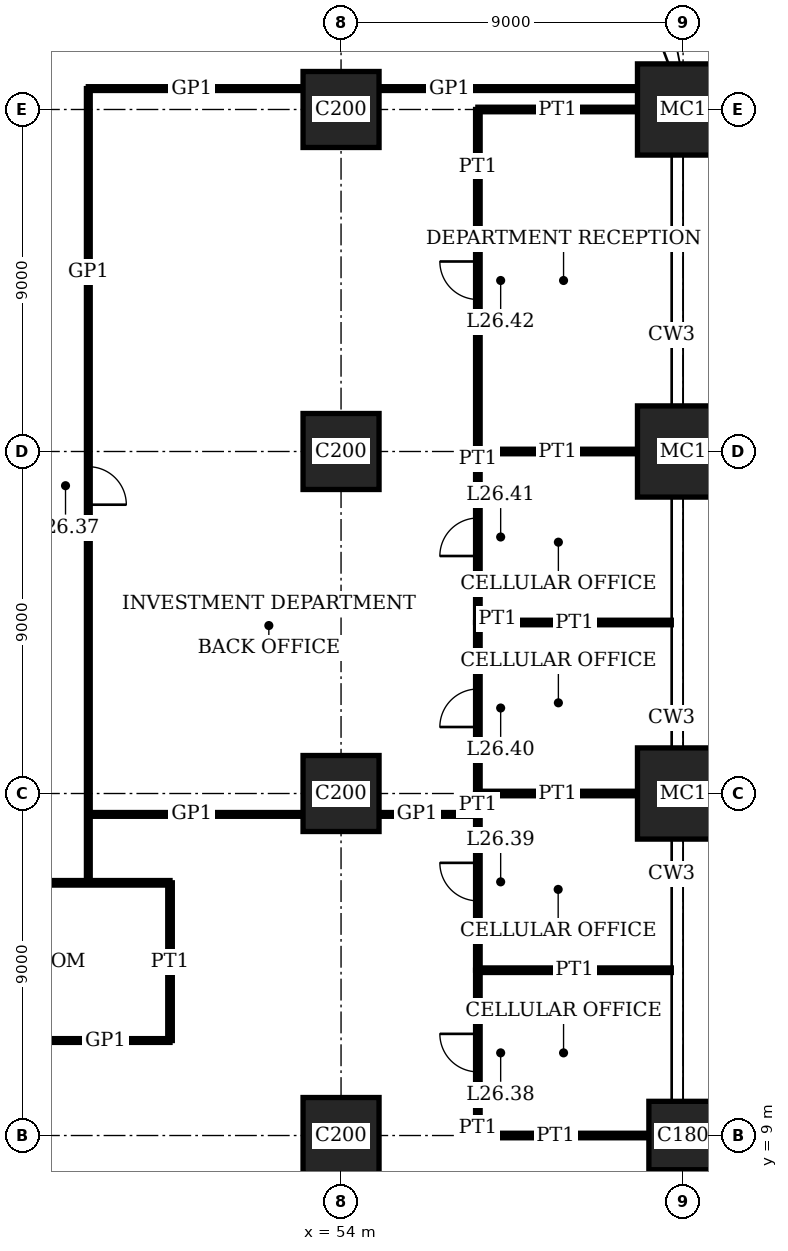
"""IFC4 building model, lengths in metres.
Left out: names, types, materials, properties, quantities, classifications, styles, units other than length and angle.
Written with IfcOpenShell. Run it as: python <this file> out.ifc"""

import sys

from ifc_helpers import new_model, si_unit, direction, frame, frame_2d, origin, origin_2d, place, context, subcontext, project, spatial, rectangle, extrude, element, fill, save


model = new_model("IFC4")
c1 = context("Model", 3, precision=1e-05, world=origin(), true_north=direction((0.0, 1.0)))
c2 = subcontext(c1, "Body", "Model", "MODEL_VIEW")
j1 = project(units=[si_unit("LENGTHUNIT", "METRE"), si_unit("PLANEANGLEUNIT", "RADIAN")], contexts=[c1])
p1 = place(None, origin())
s1 = spatial("IfcSite", under=j1, at=p1, CompositionType="ELEMENT")
p2 = place(p1, origin())
s2 = spatial("IfcBuilding", under=s1, at=p2, CompositionType="ELEMENT")
p3 = place(p2, frame((0.0, 0.0, 109.0)))
s3 = spatial("IfcBuildingStorey", under=s2, at=p3, CompositionType="ELEMENT", Elevation=109.0)
for number, where, z_axis, x_axis in (
    (1, (54.0, 9.0, 0.0), (0.0, 0.0, 1.0), (1.0, 0.0, 0.0)),
    (2, (54.0, 18.0, 0.0), (0.0, 0.0, 1.0), (1.0, 0.0, 0.0)),
    (3, (54.0, 27.0, 0.0), (0.0, 0.0, 1.0), (1.0, 0.0, 0.0)),
    (4, (54.0, 36.0, 0.0), (0.0, 0.0, 1.0), (1.0, 0.0, 0.0)),
):
    element("IfcColumn", number, at=place(p3, frame(where, z_axis=z_axis, x_axis=x_axis)), inside=s3, PredefinedType="COLUMN", context=c2, shape_type="SweptSolid", body=[
        extrude(rectangle(XDim=2.0, YDim=2.0, at=origin_2d()), origin(), (0.0, 0.0, 1.0), 4.0),
    ])
p4 = place(p3, frame((63.0, 9.0, 0.0), z_axis=(0.0, 0.0, 1.0), x_axis=(1.0, 0.0, 0.0)))
e5 = element("IfcColumn", 5, at=p4, inside=s3, PredefinedType="COLUMN", context=c2, shape_type="SweptSolid", body=[
    extrude(rectangle(XDim=1.8, YDim=1.8, at=origin_2d()), origin(), (0.0, 0.0, 1.0), 4.0),
])
for number, where, z_axis, x_axis in (
    (6, (63.0, 18.0, 0.0), (0.0, 0.0, 1.0), (1.0, 0.0, 0.0)),
    (7, (63.0, 27.0, 0.0), (0.0, 0.0, 1.0), (1.0, 0.0, 0.0)),
    (8, (63.0, 36.0, 0.0), (0.0, 0.0, 1.0), (1.0, 0.0, 0.0)),
):
    element("IfcColumn", number, at=place(p3, frame(where, z_axis=z_axis, x_axis=x_axis)), inside=s3, PredefinedType="COLUMN", context=c2, shape_type="SweptSolid", body=[
        extrude(rectangle(XDim=2.4, YDim=2.4, at=origin_2d()), origin(), (0.0, 0.0, 1.0), 4.0),
    ])
p5 = place(p3, frame((57.6, 9.0, 0.0), z_axis=(0.0, 0.0, 1.0), x_axis=(1.0, 0.0, 0.0)))
e9 = element("IfcWall", 9, at=p5, inside=s3, PredefinedType="PARTITIONING", context=c2, shape_type="SweptSolid", body=[
    extrude(rectangle(XDim=4.5, YDim=0.12, at=frame_2d((2.25, 0.0))), origin(), (0.0, 0.0, 1.0), 3.05),
])
p6 = place(p3, frame((40.5, 11.5, 0.0), z_axis=(0.0, 0.0, 1.0), x_axis=(1.0, 0.0, 0.0)))
e10 = element("IfcWall", 10, at=p6, inside=s3, PredefinedType="PARTITIONING", context=c2, shape_type="SweptSolid", body=[
    extrude(rectangle(XDim=9.0, YDim=0.1, at=frame_2d((4.5, 0.0))), origin(), (0.0, 0.0, 1.0), 3.75),
])
p7 = place(p6, frame((4.0, 0.0, 0.0)))
e11 = element("IfcOpeningElement", 11, at=p7, cuts=e10, PredefinedType="OPENING", context=c2, shape_type="SweptSolid", body=[
    extrude(rectangle(XDim=1.0, YDim=2.4, at=frame_2d((0.5, 1.2))), frame((0.0, 0.06, 0.0), z_axis=(0.0, -1.0, 0.0), x_axis=(1.0, 0.0, 0.0)), (0.0, 0.0, 1.0), 0.12),
])
p8 = place(p3, frame((57.6, 13.35, 0.0), z_axis=(0.0, 0.0, 1.0), x_axis=(1.0, 0.0, 0.0)))
e12 = element("IfcWall", 12, at=p8, inside=s3, PredefinedType="PARTITIONING", context=c2, shape_type="SweptSolid", body=[
    extrude(rectangle(XDim=5.09, YDim=0.12, at=frame_2d((2.545, 0.0))), origin(), (0.0, 0.0, 1.0), 3.1),
])
p9 = place(p3, frame((40.5, 15.65, 0.0), z_axis=(0.0, 0.0, 1.0), x_axis=(1.0, 0.0, 0.0)))
e13 = element("IfcWall", 13, at=p9, inside=s3, PredefinedType="PARTITIONING", context=c2, shape_type="SweptSolid", body=[
    extrude(rectangle(XDim=9.0, YDim=0.12, at=frame_2d((4.5, 0.0))), origin(), (0.0, 0.0, 1.0), 3.75),
])
p10 = place(p3, frame((47.35, 17.45, 0.0), z_axis=(0.0, 0.0, 1.0), x_axis=(1.0, 0.0, 0.0)))
e14 = element("IfcWall", 14, at=p10, inside=s3, PredefinedType="PARTITIONING", context=c2, shape_type="SweptSolid", body=[
    extrude(rectangle(XDim=5.65, YDim=0.1, at=frame_2d((2.825, 0.0))), origin(), (0.0, 0.0, 1.0), 3.75),
])
p11 = place(p3, frame((55.0, 17.45, 0.0), z_axis=(0.0, 0.0, 1.0), x_axis=(1.0, 0.0, 0.0)))
e15 = element("IfcWall", 15, at=p11, inside=s3, PredefinedType="PARTITIONING", context=c2, shape_type="SweptSolid", body=[
    extrude(rectangle(XDim=2.61, YDim=0.1, at=frame_2d((1.305, 0.0))), origin(), (0.0, 0.0, 1.0), 3.75),
])
p12 = place(p3, frame((57.6, 18.0, 0.0), z_axis=(0.0, 0.0, 1.0), x_axis=(1.0, 0.0, 0.0)))
e16 = element("IfcWall", 16, at=p12, inside=s3, PredefinedType="PARTITIONING", context=c2, shape_type="SweptSolid", body=[
    extrude(rectangle(XDim=4.2, YDim=0.12, at=frame_2d((2.1, 0.0))), origin(), (0.0, 0.0, 1.0), 3.05),
])
p13 = place(p3, frame((57.6, 22.5, 0.0), z_axis=(0.0, 0.0, 1.0), x_axis=(1.0, 0.0, 0.0)))
e17 = element("IfcWall", 17, at=p13, inside=s3, PredefinedType="PARTITIONING", context=c2, shape_type="SweptSolid", body=[
    extrude(rectangle(XDim=5.09, YDim=0.12, at=frame_2d((2.545, 0.0))), origin(), (0.0, 0.0, 1.0), 3.1),
])
for number, where, z_axis, x_axis in (
    (18, (57.6, 27.0, 0.0), (0.0, 0.0, 1.0), (1.0, 0.0, 0.0)),
    (19, (57.6, 36.0, 0.0), (0.0, 0.0, 1.0), (1.0, 0.0, 0.0)),
):
    element("IfcWall", number, at=place(p3, frame(where, z_axis=z_axis, x_axis=x_axis)), inside=s3, PredefinedType="PARTITIONING", context=c2, shape_type="SweptSolid", body=[
        extrude(rectangle(XDim=4.2, YDim=0.12, at=frame_2d((2.1, 0.0))), origin(), (0.0, 0.0, 1.0), 3.05),
    ])
p14 = place(p3, frame((47.35, 36.55, 0.0), z_axis=(0.0, 0.0, 1.0), x_axis=(1.0, 0.0, 0.0)))
e20 = element("IfcWall", 20, at=p14, inside=s3, PredefinedType="PARTITIONING", context=c2, shape_type="SweptSolid", body=[
    extrude(rectangle(XDim=5.65, YDim=0.1, at=frame_2d((2.825, 0.0))), origin(), (0.0, 0.0, 1.0), 3.75),
])
p15 = place(p3, frame((55.0, 36.55, 0.0), z_axis=(0.0, 0.0, 1.0), x_axis=(1.0, 0.0, 0.0)))
e21 = element("IfcWall", 21, at=p15, inside=s3, PredefinedType="PARTITIONING", context=c2, shape_type="SweptSolid", body=[
    extrude(rectangle(XDim=6.8, YDim=0.1, at=frame_2d((3.4, 0.0))), origin(), (0.0, 0.0, 1.0), 3.75),
])
p16 = place(p3, frame((47.35, 15.65, 0.0), z_axis=(0.0, 0.0, 1.0), x_axis=(0.0, 1.0, 0.0)))
e22 = element("IfcWall", 22, at=p16, inside=s3, PredefinedType="PARTITIONING", context=c2, shape_type="SweptSolid", body=[
    extrude(rectangle(XDim=20.9, YDim=0.1, at=frame_2d((10.45, 0.0))), origin(), (0.0, 0.0, 1.0), 3.75),
])
p17 = place(p16, frame((9.95, 0.0, 0.0)))
e23 = element("IfcOpeningElement", 23, at=p17, cuts=e22, PredefinedType="OPENING", context=c2, shape_type="SweptSolid", body=[
    extrude(rectangle(XDim=1.0, YDim=2.4, at=frame_2d((0.5, 1.2))), frame((0.0, 0.06, 0.0), z_axis=(0.0, -1.0, 0.0), x_axis=(1.0, 0.0, 0.0)), (0.0, 0.0, 1.0), 0.12),
])
p18 = place(p3, frame((49.5, 11.5, 0.0), z_axis=(0.0, 0.0, 1.0), x_axis=(0.0, 1.0, 0.0)))
e24 = element("IfcWall", 24, at=p18, inside=s3, PredefinedType="PARTITIONING", context=c2, shape_type="SweptSolid", body=[
    extrude(rectangle(XDim=4.15, YDim=0.12, at=frame_2d((2.075, 0.0))), origin(), (0.0, 0.0, 1.0), 3.75),
])
p19 = place(p3, frame((57.6, 9.0, 0.0), z_axis=(0.0, 0.0, 1.0), x_axis=(0.0, 1.0, 0.0)))
e25 = element("IfcWall", 25, at=p19, inside=s3, PredefinedType="PARTITIONING", context=c2, shape_type="SweptSolid", body=[
    extrude(rectangle(XDim=4.35, YDim=0.12, at=frame_2d((2.175, 0.0))), origin(), (0.0, 0.0, 1.0), 3.75),
])
p20 = place(p19, frame((1.675, 0.0, 0.0)))
e26 = element("IfcOpeningElement", 26, at=p20, cuts=e25, PredefinedType="OPENING", context=c2, shape_type="SweptSolid", body=[
    extrude(rectangle(XDim=1.0, YDim=2.4, at=frame_2d((0.5, 1.2))), frame((0.0, 0.07, 0.0), z_axis=(0.0, -1.0, 0.0), x_axis=(1.0, 0.0, 0.0)), (0.0, 0.0, 1.0), 0.14),
])
p21 = place(p3, frame((57.6, 13.35, 0.0), z_axis=(0.0, 0.0, 1.0), x_axis=(0.0, 1.0, 0.0)))
e27 = element("IfcWall", 27, at=p21, inside=s3, PredefinedType="PARTITIONING", context=c2, shape_type="SweptSolid", body=[
    extrude(rectangle(XDim=4.65, YDim=0.12, at=frame_2d((2.325, 0.0))), origin(), (0.0, 0.0, 1.0), 3.75),
])
p22 = place(p21, frame((1.825, 0.0, 0.0)))
e28 = element("IfcOpeningElement", 28, at=p22, cuts=e27, PredefinedType="OPENING", context=c2, shape_type="SweptSolid", body=[
    extrude(rectangle(XDim=1.0, YDim=2.4, at=frame_2d((0.5, 1.2))), frame((0.0, 0.07, 0.0), z_axis=(0.0, -1.0, 0.0), x_axis=(1.0, 0.0, 0.0)), (0.0, 0.0, 1.0), 0.14),
])
p23 = place(p3, frame((57.6, 18.0, 0.0), z_axis=(0.0, 0.0, 1.0), x_axis=(0.0, 1.0, 0.0)))
e29 = element("IfcWall", 29, at=p23, inside=s3, PredefinedType="PARTITIONING", context=c2, shape_type="SweptSolid", body=[
    extrude(rectangle(XDim=4.5, YDim=0.12, at=frame_2d((2.25, 0.0))), origin(), (0.0, 0.0, 1.0), 3.75),
])
p24 = place(p23, frame((1.75, 0.0, 0.0)))
e30 = element("IfcOpeningElement", 30, at=p24, cuts=e29, PredefinedType="OPENING", context=c2, shape_type="SweptSolid", body=[
    extrude(rectangle(XDim=1.0, YDim=2.4, at=frame_2d((0.5, 1.2))), frame((0.0, 0.07, 0.0), z_axis=(0.0, -1.0, 0.0), x_axis=(1.0, 0.0, 0.0)), (0.0, 0.0, 1.0), 0.14),
])
p25 = place(p3, frame((57.6, 22.5, 0.0), z_axis=(0.0, 0.0, 1.0), x_axis=(0.0, 1.0, 0.0)))
e31 = element("IfcWall", 31, at=p25, inside=s3, PredefinedType="PARTITIONING", context=c2, shape_type="SweptSolid", body=[
    extrude(rectangle(XDim=4.5, YDim=0.12, at=frame_2d((2.25, 0.0))), origin(), (0.0, 0.0, 1.0), 3.75),
])
p26 = place(p25, frame((1.75, 0.0, 0.0)))
e32 = element("IfcOpeningElement", 32, at=p26, cuts=e31, PredefinedType="OPENING", context=c2, shape_type="SweptSolid", body=[
    extrude(rectangle(XDim=1.0, YDim=2.4, at=frame_2d((0.5, 1.2))), frame((0.0, 0.07, 0.0), z_axis=(0.0, -1.0, 0.0), x_axis=(1.0, 0.0, 0.0)), (0.0, 0.0, 1.0), 0.14),
])
p27 = place(p3, frame((57.6, 27.0, 0.0), z_axis=(0.0, 0.0, 1.0), x_axis=(0.0, 1.0, 0.0)))
e33 = element("IfcWall", 33, at=p27, inside=s3, PredefinedType="PARTITIONING", context=c2, shape_type="SweptSolid", body=[
    extrude(rectangle(XDim=9.0, YDim=0.12, at=frame_2d((4.5, 0.0))), origin(), (0.0, 0.0, 1.0), 3.75),
])
p28 = place(p27, frame((4.0, 0.0, 0.0)))
e34 = element("IfcOpeningElement", 34, at=p28, cuts=e33, PredefinedType="OPENING", context=c2, shape_type="SweptSolid", body=[
    extrude(rectangle(XDim=1.0, YDim=2.4, at=frame_2d((0.5, 1.2))), frame((0.0, 0.07, 0.0), z_axis=(0.0, -1.0, 0.0), x_axis=(1.0, 0.0, 0.0)), (0.0, 0.0, 1.0), 0.14),
])
p29 = place(p17, origin())
e35 = element("IfcDoor", 35, at=p29, inside=s3, OperationType="SINGLE_SWING_LEFT", PredefinedType="DOOR", context=c2, shape_type="SweptSolid", body=[
    extrude(rectangle(XDim=1.0, YDim=2.4, at=frame_2d((0.5, 1.2))), frame((0.0, 0.02, 0.0), z_axis=(0.0, -1.0, 0.0), x_axis=(1.0, 0.0, 0.0)), (0.0, 0.0, 1.0), 0.04),
])
fill(e23, e35)
p30 = place(p20, origin())
e36 = element("IfcDoor", 36, at=p30, inside=s3, OperationType="SINGLE_SWING_LEFT", PredefinedType="DOOR", context=c2, shape_type="SweptSolid", body=[
    extrude(rectangle(XDim=1.0, YDim=2.4, at=frame_2d((0.5, 1.2))), frame((0.0, 0.025, 0.0), z_axis=(0.0, -1.0, 0.0), x_axis=(1.0, 0.0, 0.0)), (0.0, 0.0, 1.0), 0.05),
])
fill(e26, e36)
p31 = place(p22, origin())
e37 = element("IfcDoor", 37, at=p31, inside=s3, OperationType="SINGLE_SWING_LEFT", PredefinedType="DOOR", context=c2, shape_type="SweptSolid", body=[
    extrude(rectangle(XDim=1.0, YDim=2.4, at=frame_2d((0.5, 1.2))), frame((0.0, 0.025, 0.0), z_axis=(0.0, -1.0, 0.0), x_axis=(1.0, 0.0, 0.0)), (0.0, 0.0, 1.0), 0.05),
])
fill(e28, e37)
p32 = place(p24, origin())
e38 = element("IfcDoor", 38, at=p32, inside=s3, OperationType="SINGLE_SWING_RIGHT", PredefinedType="DOOR", context=c2, shape_type="SweptSolid", body=[
    extrude(rectangle(XDim=1.0, YDim=2.4, at=frame_2d((0.5, 1.2))), frame((0.0, 0.025, 0.0), z_axis=(0.0, -1.0, 0.0), x_axis=(1.0, 0.0, 0.0)), (0.0, 0.0, 1.0), 0.05),
])
fill(e30, e38)
p33 = place(p26, origin())
e39 = element("IfcDoor", 39, at=p33, inside=s3, OperationType="SINGLE_SWING_RIGHT", PredefinedType="DOOR", context=c2, shape_type="SweptSolid", body=[
    extrude(rectangle(XDim=1.0, YDim=2.4, at=frame_2d((0.5, 1.2))), frame((0.0, 0.025, 0.0), z_axis=(0.0, -1.0, 0.0), x_axis=(1.0, 0.0, 0.0)), (0.0, 0.0, 1.0), 0.05),
])
fill(e32, e39)
p34 = place(p28, origin())
e40 = element("IfcDoor", 40, at=p34, inside=s3, OperationType="SINGLE_SWING_LEFT", PredefinedType="DOOR", context=c2, shape_type="SweptSolid", body=[
    extrude(rectangle(XDim=1.0, YDim=2.4, at=frame_2d((0.5, 1.2))), frame((0.0, 0.025, 0.0), z_axis=(0.0, -1.0, 0.0), x_axis=(1.0, 0.0, 0.0)), (0.0, 0.0, 1.0), 0.05),
])
fill(e34, e40)
save(model, sys.argv[1])
